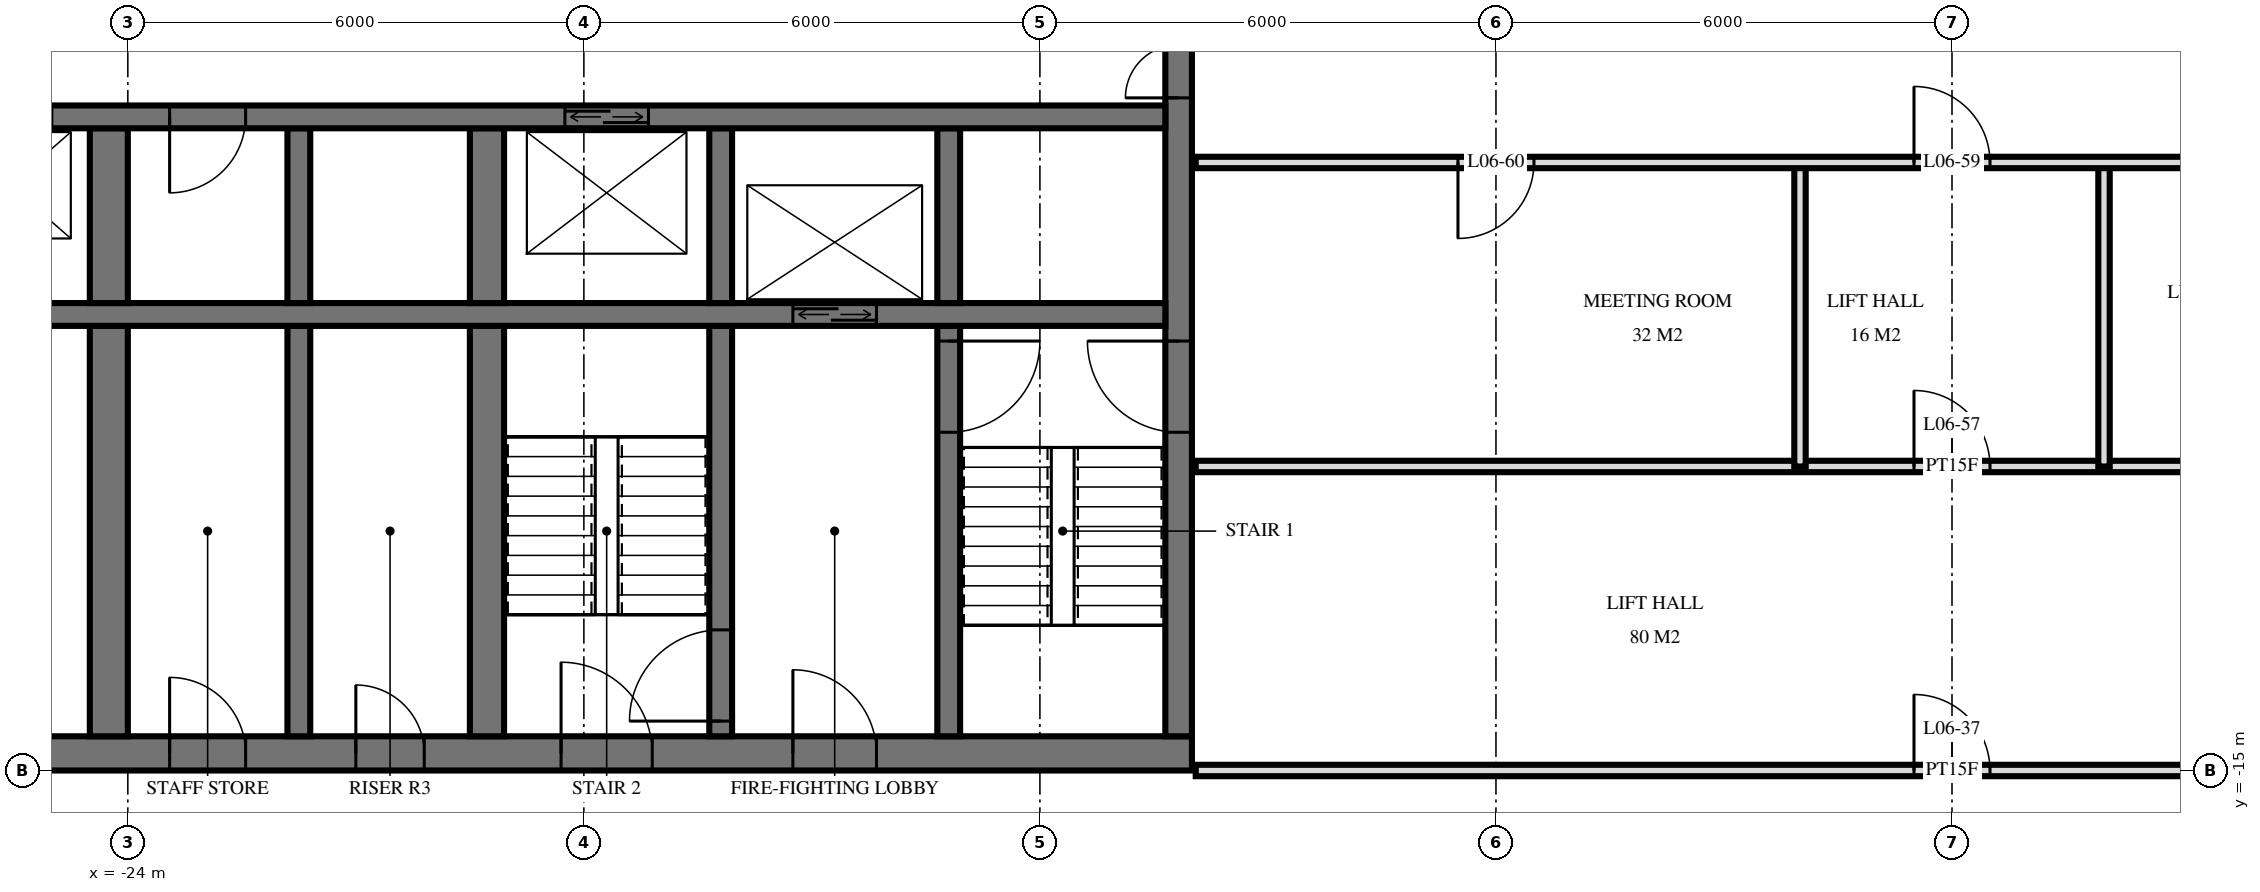
"""IFC4 building model, lengths in metres.
Left out: names, types, materials, properties, quantities, classifications, styles, units other than length and angle.
Written with IfcOpenShell. Run it as: python <this file> out.ifc"""

import sys

from ifc_helpers import new_model, si_unit, direction, frame, frame_2d, origin, place, context, subcontext, project, spatial, rectangle, extrude, element, fill, save


model = new_model("IFC4")
c1 = context("Model", 3, precision=1e-05, world=origin(), true_north=direction((0.0, 1.0)))
c2 = subcontext(c1, "Body", "Model", "MODEL_VIEW")
j1 = project(units=[si_unit("LENGTHUNIT", "METRE"), si_unit("PLANEANGLEUNIT", "RADIAN")], contexts=[c1])
p1 = place(None, origin())
s1 = spatial("IfcSite", under=j1, at=p1, CompositionType="ELEMENT")
p2 = place(p1, origin())
s2 = spatial("IfcBuilding", under=s1, at=p2, CompositionType="ELEMENT")
p3 = place(p2, frame((0.0, 0.0, 31.2)))
s3 = spatial("IfcBuildingStorey", under=s2, at=p3, CompositionType="ELEMENT", Elevation=31.2)
p4 = place(p3, frame((-29.5, -14.775, 0.0), z_axis=(0.0, 0.0, 1.0), x_axis=(1.0, 0.0, 0.0)))
e1 = element("IfcWall", 1, at=p4, inside=s3, PredefinedType="SHEAR", context=c2, shape_type="SweptSolid", body=[
    extrude(rectangle(XDim=19.5, YDim=0.45, at=frame_2d((9.75, 0.0))), origin(), (0.0, 0.0, 1.0), 3.6),
])
p5 = place(p4, frame((11.2, 0.0, 0.0)))
e2 = element("IfcOpeningElement", 2, at=p5, cuts=e1, PredefinedType="OPENING", context=c2, shape_type="SweptSolid", body=[
    extrude(rectangle(XDim=1.2, YDim=2.1, at=frame_2d((0.6, 1.05))), frame((0.0, 0.235, 0.0), z_axis=(0.0, -1.0, 0.0), x_axis=(1.0, 0.0, 0.0)), (0.0, 0.0, 1.0), 0.47),
])
p6 = place(p4, frame((14.25, 0.0, 0.0)))
e3 = element("IfcOpeningElement", 3, at=p6, cuts=e1, PredefinedType="OPENING", context=c2, shape_type="SweptSolid", body=[
    extrude(rectangle(XDim=1.1, YDim=2.1, at=frame_2d((0.55, 1.05))), frame((0.0, 0.235, 0.0), z_axis=(0.0, -1.0, 0.0), x_axis=(1.0, 0.0, 0.0)), (0.0, 0.0, 1.0), 0.47),
])
p7 = place(p4, frame((8.5, 0.0, 0.0)))
e4 = element("IfcOpeningElement", 4, at=p7, cuts=e1, PredefinedType="OPENING", context=c2, shape_type="SweptSolid", body=[
    extrude(rectangle(XDim=0.9, YDim=2.1, at=frame_2d((0.45, 1.05))), frame((0.0, 0.235, 0.0), z_axis=(0.0, -1.0, 0.0), x_axis=(1.0, 0.0, 0.0)), (0.0, 0.0, 1.0), 0.47),
])
p8 = place(p4, frame((6.05, 0.0, 0.0)))
e5 = element("IfcOpeningElement", 5, at=p8, cuts=e1, PredefinedType="OPENING", context=c2, shape_type="SweptSolid", body=[
    extrude(rectangle(XDim=1.0, YDim=2.1, at=frame_2d((0.5, 1.05))), frame((0.0, 0.235, 0.0), z_axis=(0.0, -1.0, 0.0), x_axis=(1.0, 0.0, 0.0)), (0.0, 0.0, 1.0), 0.47),
])
p9 = place(p4, frame((2.988, 0.0, 0.0)))
e6 = element("IfcOpeningElement", 6, at=p9, cuts=e1, PredefinedType="OPENING", context=c2, shape_type="SweptSolid", body=[
    extrude(rectangle(XDim=1.0, YDim=2.1, at=frame_2d((0.5, 1.05))), frame((0.0, 0.235, 0.0), z_axis=(0.0, -1.0, 0.0), x_axis=(1.0, 0.0, 0.0)), (0.0, 0.0, 1.0), 0.47),
])
p10 = place(p4, frame((0.663, 0.0, 0.0)))
e7 = element("IfcOpeningElement", 7, at=p10, cuts=e1, PredefinedType="OPENING", context=c2, shape_type="SweptSolid", body=[
    extrude(rectangle(XDim=1.0, YDim=2.1, at=frame_2d((0.5, 1.05))), frame((0.0, 0.235, 0.0), z_axis=(0.0, -1.0, 0.0), x_axis=(1.0, 0.0, 0.0)), (0.0, 0.0, 1.0), 0.47),
])
p11 = place(p3, frame((-10.175, -14.55, 0.0), z_axis=(0.0, 0.0, 1.0), x_axis=(0.0, 1.0, 0.0)))
e8 = element("IfcWall", 8, at=p11, inside=s3, PredefinedType="SHEAR", context=c2, shape_type="SweptSolid", body=[
    extrude(rectangle(XDim=14.1, YDim=0.35, at=frame_2d((7.05, 0.0))), origin(), (0.0, 0.0, 1.0), 3.6),
])
p12 = place(p11, frame((8.4, 0.0, 0.0)))
e9 = element("IfcOpeningElement", 9, at=p12, cuts=e8, PredefinedType="OPENING", context=c2, shape_type="SweptSolid", body=[
    extrude(rectangle(XDim=1.4, YDim=2.4, at=frame_2d((0.7, 1.2))), frame((0.0, 0.185, 0.0), z_axis=(0.0, -1.0, 0.0), x_axis=(1.0, 0.0, 0.0)), (0.0, 0.0, 1.0), 0.37),
])
p13 = place(p11, frame((10.0, 0.0, 0.0)))
e10 = element("IfcOpeningElement", 10, at=p13, cuts=e8, PredefinedType="OPENING", context=c2, shape_type="SweptSolid", body=[
    extrude(rectangle(XDim=1.4, YDim=2.4, at=frame_2d((0.7, 1.2))), frame((0.0, 0.185, 0.0), z_axis=(0.0, -1.0, 0.0), x_axis=(1.0, 0.0, 0.0)), (0.0, 0.0, 1.0), 0.37),
])
p14 = place(p11, frame((4.0, 0.0, 0.0)))
e11 = element("IfcOpeningElement", 11, at=p14, cuts=e8, PredefinedType="OPENING", context=c2, shape_type="SweptSolid", body=[
    extrude(rectangle(XDim=1.2, YDim=2.1, at=frame_2d((0.6, 1.05))), frame((0.0, 0.185, 0.0), z_axis=(0.0, -1.0, 0.0), x_axis=(1.0, 0.0, 0.0)), (0.0, 0.0, 1.0), 0.37),
])
p15 = place(p3, frame((-29.05, -6.4, 0.0), z_axis=(0.0, 0.0, 1.0), x_axis=(1.0, 0.0, 0.0)))
e12 = element("IfcWall", 12, at=p15, inside=s3, PredefinedType="SHEAR", context=c2, shape_type="SweptSolid", body=[
    extrude(rectangle(XDim=18.7, YDim=0.3, at=frame_2d((9.35, 0.0))), origin(), (0.0, 0.0, 1.0), 3.6),
])
p16 = place(p15, frame((2.95, 0.0, 0.0)))
e13 = element("IfcOpeningElement", 13, at=p16, cuts=e12, PredefinedType="OPENING", context=c2, shape_type="SweptSolid", body=[
    extrude(rectangle(XDim=1.1, YDim=2.1, at=frame_2d((0.55, 1.05))), frame((0.0, 0.16, 0.0), z_axis=(0.0, -1.0, 0.0), x_axis=(1.0, 0.0, 0.0)), (0.0, 0.0, 1.0), 0.32),
])
p17 = place(p15, frame((0.55, 0.0, 0.0)))
e14 = element("IfcOpeningElement", 14, at=p17, cuts=e12, PredefinedType="OPENING", context=c2, shape_type="SweptSolid", body=[
    extrude(rectangle(XDim=1.1, YDim=2.1, at=frame_2d((0.55, 1.05))), frame((0.0, 0.16, 0.0), z_axis=(0.0, -1.0, 0.0), x_axis=(1.0, 0.0, 0.0)), (0.0, 0.0, 1.0), 0.32),
])
p18 = place(p15, frame((10.8, 0.0, 0.0)))
e15 = element("IfcOpeningElement", 15, at=p18, cuts=e12, PredefinedType="OPENING", context=c2, shape_type="SweptSolid", body=[
    extrude(rectangle(XDim=1.1, YDim=2.1, at=frame_2d((0.55, 1.05))), frame((0.0, 0.16, 0.0), z_axis=(0.0, -1.0, 0.0), x_axis=(1.0, 0.0, 0.0)), (0.0, 0.0, 1.0), 0.32),
])
p19 = place(p15, frame((5.6, 0.0, 0.0)))
e16 = element("IfcOpeningElement", 16, at=p19, cuts=e12, PredefinedType="OPENING", context=c2, shape_type="SweptSolid", body=[
    extrude(rectangle(XDim=1.0, YDim=2.1, at=frame_2d((0.5, 1.05))), frame((0.0, 0.16, 0.0), z_axis=(0.0, -1.0, 0.0), x_axis=(1.0, 0.0, 0.0)), (0.0, 0.0, 1.0), 0.32),
])
p20 = place(p3, frame((-29.05, -9.0, 0.0), z_axis=(0.0, 0.0, 1.0), x_axis=(1.0, 0.0, 0.0)))
e17 = element("IfcWall", 17, at=p20, inside=s3, PredefinedType="SHEAR", context=c2, shape_type="SweptSolid", body=[
    extrude(rectangle(XDim=18.7, YDim=0.3, at=frame_2d((9.35, 0.0))), origin(), (0.0, 0.0, 1.0), 3.6),
])
p21 = place(p20, frame((13.8, 0.0, 0.0)))
e18 = element("IfcOpeningElement", 18, at=p21, cuts=e17, PredefinedType="OPENING", context=c2, shape_type="SweptSolid", body=[
    extrude(rectangle(XDim=1.1, YDim=2.1, at=frame_2d((0.55, 1.05))), frame((0.0, 0.16, 0.0), z_axis=(0.0, -1.0, 0.0), x_axis=(1.0, 0.0, 0.0)), (0.0, 0.0, 1.0), 0.32),
])
p22 = place(p3, frame((-13.2, -8.85, 0.0), z_axis=(0.0, 0.0, 1.0), x_axis=(0.0, 1.0, 0.0)))
e19 = element("IfcWall", 19, at=p22, inside=s3, PredefinedType="SHEAR", context=c2, shape_type="SweptSolid", body=[
    extrude(rectangle(XDim=2.3, YDim=0.3, at=frame_2d((1.15, 0.0))), origin(), (0.0, 0.0, 1.0), 3.6),
])
p23 = place(p3, frame((-13.2, -14.55, 0.0), z_axis=(0.0, 0.0, 1.0), x_axis=(0.0, 1.0, 0.0)))
e20 = element("IfcWall", 20, at=p23, inside=s3, PredefinedType="SHEAR", context=c2, shape_type="SweptSolid", body=[
    extrude(rectangle(XDim=5.4, YDim=0.3, at=frame_2d((2.7, 0.0))), origin(), (0.0, 0.0, 1.0), 3.6),
])
p24 = place(p23, frame((4.0, 0.0, 0.0)))
e21 = element("IfcOpeningElement", 21, at=p24, cuts=e20, PredefinedType="OPENING", context=c2, shape_type="SweptSolid", body=[
    extrude(rectangle(XDim=1.2, YDim=2.1, at=frame_2d((0.6, 1.05))), frame((0.0, 0.16, 0.0), z_axis=(0.0, -1.0, 0.0), x_axis=(1.0, 0.0, 0.0)), (0.0, 0.0, 1.0), 0.32),
])
p25 = place(p3, frame((-16.2, -8.85, 0.0), z_axis=(0.0, 0.0, 1.0), x_axis=(0.0, 1.0, 0.0)))
e22 = element("IfcWall", 22, at=p25, inside=s3, PredefinedType="SHEAR", context=c2, shape_type="SweptSolid", body=[
    extrude(rectangle(XDim=2.3, YDim=0.3, at=frame_2d((1.15, 0.0))), origin(), (0.0, 0.0, 1.0), 3.6),
])
p26 = place(p3, frame((-16.2, -14.55, 0.0), z_axis=(0.0, 0.0, 1.0), x_axis=(0.0, 1.0, 0.0)))
e23 = element("IfcWall", 23, at=p26, inside=s3, PredefinedType="SHEAR", context=c2, shape_type="SweptSolid", body=[
    extrude(rectangle(XDim=5.4, YDim=0.3, at=frame_2d((2.7, 0.0))), origin(), (0.0, 0.0, 1.0), 3.6),
])
p27 = place(p26, frame((0.2, 0.0, 0.0)))
e24 = element("IfcOpeningElement", 24, at=p27, cuts=e23, PredefinedType="OPENING", context=c2, shape_type="SweptSolid", body=[
    extrude(rectangle(XDim=1.2, YDim=2.1, at=frame_2d((0.6, 1.05))), frame((0.0, 0.16, 0.0), z_axis=(0.0, -1.0, 0.0), x_axis=(1.0, 0.0, 0.0)), (0.0, 0.0, 1.0), 0.32),
])
p28 = place(p3, frame((-19.275, -8.85, 0.0), z_axis=(0.0, 0.0, 1.0), x_axis=(0.0, 1.0, 0.0)))
e25 = element("IfcWall", 25, at=p28, inside=s3, PredefinedType="SHEAR", context=c2, shape_type="SweptSolid", body=[
    extrude(rectangle(XDim=2.3, YDim=0.45, at=frame_2d((1.15, 0.0))), origin(), (0.0, 0.0, 1.0), 3.6),
])
p29 = place(p3, frame((-19.275, -14.55, 0.0), z_axis=(0.0, 0.0, 1.0), x_axis=(0.0, 1.0, 0.0)))
e26 = element("IfcWall", 26, at=p29, inside=s3, PredefinedType="SHEAR", context=c2, shape_type="SweptSolid", body=[
    extrude(rectangle(XDim=5.4, YDim=0.45, at=frame_2d((2.7, 0.0))), origin(), (0.0, 0.0, 1.0), 3.6),
])
p30 = place(p3, frame((-21.75, -8.85, 0.0), z_axis=(0.0, 0.0, 1.0), x_axis=(0.0, 1.0, 0.0)))
e27 = element("IfcWall", 27, at=p30, inside=s3, PredefinedType="SHEAR", context=c2, shape_type="SweptSolid", body=[
    extrude(rectangle(XDim=2.3, YDim=0.3, at=frame_2d((1.15, 0.0))), origin(), (0.0, 0.0, 1.0), 3.6),
])
p31 = place(p3, frame((-21.75, -14.55, 0.0), z_axis=(0.0, 0.0, 1.0), x_axis=(0.0, 1.0, 0.0)))
e28 = element("IfcWall", 28, at=p31, inside=s3, PredefinedType="SHEAR", context=c2, shape_type="SweptSolid", body=[
    extrude(rectangle(XDim=5.4, YDim=0.3, at=frame_2d((2.7, 0.0))), origin(), (0.0, 0.0, 1.0), 3.6),
])
p32 = place(p3, frame((-24.25, -8.85, 0.0), z_axis=(0.0, 0.0, 1.0), x_axis=(0.0, 1.0, 0.0)))
e29 = element("IfcWall", 29, at=p32, inside=s3, PredefinedType="SHEAR", context=c2, shape_type="SweptSolid", body=[
    extrude(rectangle(XDim=2.3, YDim=0.5, at=frame_2d((1.15, 0.0))), origin(), (0.0, 0.0, 1.0), 3.6),
])
p33 = place(p3, frame((-24.25, -14.55, 0.0), z_axis=(0.0, 0.0, 1.0), x_axis=(0.0, 1.0, 0.0)))
e30 = element("IfcWall", 30, at=p33, inside=s3, PredefinedType="SHEAR", context=c2, shape_type="SweptSolid", body=[
    extrude(rectangle(XDim=5.4, YDim=0.5, at=frame_2d((2.7, 0.0))), origin(), (0.0, 0.0, 1.0), 3.6),
])
for number, where, z_axis, x_axis in (
    (31, (2.0, -11.0, 0.0), (0.0, 0.0, 1.0), (0.0, 1.0, 0.0)),
    (32, (-2.0, -11.0, 0.0), (0.0, 0.0, 1.0), (0.0, 1.0, 0.0)),
):
    element("IfcWall", number, at=place(p3, frame(where, z_axis=z_axis, x_axis=x_axis)), inside=s3, PredefinedType="PARTITIONING", context=c2, shape_type="SweptSolid", body=[
        extrude(rectangle(XDim=4.0, YDim=0.15, at=frame_2d((2.0, 0.0))), origin(), (0.0, 0.0, 1.0), 3.32),
    ])
p34 = place(p3, frame((-9.95, -15.0, 0.0), z_axis=(0.0, 0.0, 1.0), x_axis=(1.0, 0.0, 0.0)))
e33 = element("IfcWall", 33, at=p34, inside=s3, PredefinedType="PARTITIONING", context=c2, shape_type="SweptSolid", body=[
    extrude(rectangle(XDim=19.9, YDim=0.15, at=frame_2d((9.95, 0.0))), origin(), (0.0, 0.0, 1.0), 2.684),
])
p35 = place(p34, frame((9.45, 0.0, 0.0)))
e34 = element("IfcOpeningElement", 34, at=p35, cuts=e33, PredefinedType="OPENING", context=c2, shape_type="SweptSolid", body=[
    extrude(rectangle(XDim=1.0, YDim=2.1, at=frame_2d((0.5, 1.05))), frame((0.0, 0.085, 0.0), z_axis=(0.0, -1.0, 0.0), x_axis=(1.0, 0.0, 0.0)), (0.0, 0.0, 1.0), 0.17),
])
p36 = place(p3, frame((-9.95, -11.0, 0.0), z_axis=(0.0, 0.0, 1.0), x_axis=(1.0, 0.0, 0.0)))
e35 = element("IfcWall", 35, at=p36, inside=s3, PredefinedType="PARTITIONING", context=c2, shape_type="SweptSolid", body=[
    extrude(rectangle(XDim=19.9, YDim=0.15, at=frame_2d((9.95, 0.0))), origin(), (0.0, 0.0, 1.0), 3.32),
])
p37 = place(p36, frame((9.45, 0.0, 0.0)))
e36 = element("IfcOpeningElement", 36, at=p37, cuts=e35, PredefinedType="OPENING", context=c2, shape_type="SweptSolid", body=[
    extrude(rectangle(XDim=1.0, YDim=2.1, at=frame_2d((0.5, 1.05))), frame((0.0, 0.085, 0.0), z_axis=(0.0, -1.0, 0.0), x_axis=(1.0, 0.0, 0.0)), (0.0, 0.0, 1.0), 0.17),
])
p38 = place(p36, frame((15.45, 0.0, 0.0)))
e37 = element("IfcOpeningElement", 37, at=p38, cuts=e35, PredefinedType="OPENING", context=c2, shape_type="SweptSolid", body=[
    extrude(rectangle(XDim=1.0, YDim=2.1, at=frame_2d((0.5, 1.05))), frame((0.0, 0.085, 0.0), z_axis=(0.0, -1.0, 0.0), x_axis=(1.0, 0.0, 0.0)), (0.0, 0.0, 1.0), 0.17),
])
p39 = place(p3, frame((-9.95, -7.0, 0.0), z_axis=(0.0, 0.0, 1.0), x_axis=(1.0, 0.0, 0.0)))
e38 = element("IfcWall", 38, at=p39, inside=s3, PredefinedType="PARTITIONING", context=c2, shape_type="SweptSolid", body=[
    extrude(rectangle(XDim=19.9, YDim=0.15, at=frame_2d((9.95, 0.0))), origin(), (0.0, 0.0, 1.0), 3.32),
])
p40 = place(p39, frame((9.45, 0.0, 0.0)))
e39 = element("IfcOpeningElement", 39, at=p40, cuts=e38, PredefinedType="OPENING", context=c2, shape_type="SweptSolid", body=[
    extrude(rectangle(XDim=1.0, YDim=2.1, at=frame_2d((0.5, 1.05))), frame((0.0, 0.085, 0.0), z_axis=(0.0, -1.0, 0.0), x_axis=(1.0, 0.0, 0.0)), (0.0, 0.0, 1.0), 0.17),
])
p41 = place(p39, frame((3.45, 0.0, 0.0)))
e40 = element("IfcOpeningElement", 40, at=p41, cuts=e38, PredefinedType="OPENING", context=c2, shape_type="SweptSolid", body=[
    extrude(rectangle(XDim=1.0, YDim=2.1, at=frame_2d((0.5, 1.05))), frame((0.0, 0.085, 0.0), z_axis=(0.0, -1.0, 0.0), x_axis=(1.0, 0.0, 0.0)), (0.0, 0.0, 1.0), 0.17),
])
p42 = place(p21, origin())
e41 = element("IfcDoor", 41, at=p42, inside=s3, OperationType="DOUBLE_DOOR_SLIDING", PredefinedType="USERDEFINED", context=c2, shape_type="SweptSolid", body=[
    extrude(rectangle(XDim=1.1, YDim=2.1, at=frame_2d((0.55, 1.05))), frame((0.0, 0.025, 0.0), z_axis=(0.0, -1.0, 0.0), x_axis=(1.0, 0.0, 0.0)), (0.0, 0.0, 1.0), 0.05),
])
fill(e18, e41)
p43 = place(p18, origin())
e42 = element("IfcDoor", 42, at=p43, inside=s3, OperationType="DOUBLE_DOOR_SLIDING", PredefinedType="USERDEFINED", context=c2, shape_type="SweptSolid", body=[
    extrude(rectangle(XDim=1.1, YDim=2.1, at=frame_2d((0.55, 1.05))), frame((0.0, 0.025, 0.0), z_axis=(0.0, -1.0, 0.0), x_axis=(1.0, 0.0, 0.0)), (0.0, 0.0, 1.0), 0.05),
])
fill(e15, e42)
p44 = place(p12, origin())
e43 = element("IfcDoor", 43, at=p44, inside=s3, OperationType="DOUBLE_DOOR_SINGLE_SWING", PredefinedType="DOOR", context=c2, shape_type="SweptSolid", body=[
    extrude(rectangle(XDim=1.4, YDim=2.4, at=frame_2d((0.7, 1.2))), frame((0.0, 0.025, 0.0), z_axis=(0.0, -1.0, 0.0), x_axis=(1.0, 0.0, 0.0)), (0.0, 0.0, 1.0), 0.05),
])
fill(e9, e43)
p45 = place(p14, origin())
e44 = element("IfcDoor", 44, at=p45, inside=s3, OperationType="SINGLE_SWING_LEFT", PredefinedType="DOOR", context=c2, shape_type="SweptSolid", body=[
    extrude(rectangle(XDim=1.2, YDim=2.1, at=frame_2d((0.6, 1.05))), frame((0.0, 0.025, 0.0), z_axis=(0.0, -1.0, 0.0), x_axis=(1.0, 0.0, 0.0)), (0.0, 0.0, 1.0), 0.05),
])
fill(e11, e44)
p46 = place(p5, origin())
e45 = element("IfcDoor", 45, at=p46, inside=s3, OperationType="SINGLE_SWING_RIGHT", PredefinedType="DOOR", context=c2, shape_type="SweptSolid", body=[
    extrude(rectangle(XDim=1.2, YDim=2.1, at=frame_2d((0.6, 1.05))), frame((0.0, 0.025, 0.0), z_axis=(0.0, -1.0, 0.0), x_axis=(1.0, 0.0, 0.0)), (0.0, 0.0, 1.0), 0.05),
])
fill(e2, e45)
p47 = place(p6, origin())
e46 = element("IfcDoor", 46, at=p47, inside=s3, OperationType="SINGLE_SWING_RIGHT", PredefinedType="DOOR", context=c2, shape_type="SweptSolid", body=[
    extrude(rectangle(XDim=1.1, YDim=2.1, at=frame_2d((0.55, 1.05))), frame((0.0, 0.025, 0.0), z_axis=(0.0, -1.0, 0.0), x_axis=(1.0, 0.0, 0.0)), (0.0, 0.0, 1.0), 0.05),
])
fill(e3, e46)
p48 = place(p7, origin())
e47 = element("IfcDoor", 47, at=p48, inside=s3, OperationType="SINGLE_SWING_RIGHT", PredefinedType="DOOR", context=c2, shape_type="SweptSolid", body=[
    extrude(rectangle(XDim=0.9, YDim=2.1, at=frame_2d((0.45, 1.05))), frame((0.0, 0.025, 0.0), z_axis=(0.0, -1.0, 0.0), x_axis=(1.0, 0.0, 0.0)), (0.0, 0.0, 1.0), 0.05),
])
fill(e4, e47)
p49 = place(p8, origin())
e48 = element("IfcDoor", 48, at=p49, inside=s3, OperationType="SINGLE_SWING_RIGHT", PredefinedType="DOOR", context=c2, shape_type="SweptSolid", body=[
    extrude(rectangle(XDim=1.0, YDim=2.1, at=frame_2d((0.5, 1.05))), frame((0.0, 0.025, 0.0), z_axis=(0.0, -1.0, 0.0), x_axis=(1.0, 0.0, 0.0)), (0.0, 0.0, 1.0), 0.05),
])
fill(e5, e48)
p50 = place(p19, frame((0.5, 0.0, 0.0), z_axis=(0.0, 0.0, 1.0), x_axis=(-1.0, 0.0, 0.0)))
e49 = element("IfcDoor", 49, at=p50, inside=s3, OperationType="SINGLE_SWING_LEFT", PredefinedType="DOOR", context=c2, shape_type="SweptSolid", body=[
    extrude(rectangle(XDim=1.0, YDim=2.1, at=frame_2d((0.0, 1.05))), frame((0.0, -0.025, 0.0), z_axis=(0.0, 1.0, 0.0), x_axis=(-1.0, 0.0, 0.0)), (0.0, 0.0, 1.0), 0.05),
])
fill(e16, e49)
p51 = place(p24, frame((0.6, 0.0, 0.0), z_axis=(0.0, 0.0, 1.0), x_axis=(-1.0, 0.0, 0.0)))
e50 = element("IfcDoor", 50, at=p51, inside=s3, OperationType="SINGLE_SWING_RIGHT", PredefinedType="DOOR", context=c2, shape_type="SweptSolid", body=[
    extrude(rectangle(XDim=1.2, YDim=2.1, at=frame_2d((0.0, 1.05))), frame((0.0, -0.025, 0.0), z_axis=(0.0, 1.0, 0.0), x_axis=(-1.0, 0.0, 0.0)), (0.0, 0.0, 1.0), 0.05),
])
fill(e21, e50)
p52 = place(p27, origin())
e51 = element("IfcDoor", 51, at=p52, inside=s3, OperationType="SINGLE_SWING_RIGHT", PredefinedType="DOOR", context=c2, shape_type="SweptSolid", body=[
    extrude(rectangle(XDim=1.2, YDim=2.1, at=frame_2d((0.6, 1.05))), frame((0.0, 0.025, 0.0), z_axis=(0.0, -1.0, 0.0), x_axis=(1.0, 0.0, 0.0)), (0.0, 0.0, 1.0), 0.05),
])
fill(e24, e51)
p53 = place(p35, origin())
e52 = element("IfcDoor", 52, at=p53, inside=s3, OperationType="SINGLE_SWING_RIGHT", PredefinedType="DOOR", context=c2, shape_type="SweptSolid", body=[
    extrude(rectangle(XDim=1.0, YDim=2.1, at=frame_2d((0.5, 1.05))), frame((0.0, 0.025, 0.0), z_axis=(0.0, -1.0, 0.0), x_axis=(1.0, 0.0, 0.0)), (0.0, 0.0, 1.0), 0.05),
])
fill(e34, e52)
p54 = place(p37, origin())
e53 = element("IfcDoor", 53, at=p54, inside=s3, OperationType="SINGLE_SWING_RIGHT", PredefinedType="DOOR", context=c2, shape_type="SweptSolid", body=[
    extrude(rectangle(XDim=1.0, YDim=2.1, at=frame_2d((0.5, 1.05))), frame((0.0, 0.025, 0.0), z_axis=(0.0, -1.0, 0.0), x_axis=(1.0, 0.0, 0.0)), (0.0, 0.0, 1.0), 0.05),
])
fill(e36, e53)
p55 = place(p40, origin())
e54 = element("IfcDoor", 54, at=p55, inside=s3, OperationType="SINGLE_SWING_RIGHT", PredefinedType="DOOR", context=c2, shape_type="SweptSolid", body=[
    extrude(rectangle(XDim=1.0, YDim=2.1, at=frame_2d((0.5, 1.05))), frame((0.0, 0.025, 0.0), z_axis=(0.0, -1.0, 0.0), x_axis=(1.0, 0.0, 0.0)), (0.0, 0.0, 1.0), 0.05),
])
fill(e39, e54)
p56 = place(p41, frame((0.5, 0.0, 0.0), z_axis=(0.0, 0.0, 1.0), x_axis=(-1.0, 0.0, 0.0)))
e55 = element("IfcDoor", 55, at=p56, inside=s3, OperationType="SINGLE_SWING_LEFT", PredefinedType="DOOR", context=c2, shape_type="SweptSolid", body=[
    extrude(rectangle(XDim=1.0, YDim=2.1, at=frame_2d((0.0, 1.05))), frame((0.0, -0.025, 0.0), z_axis=(0.0, 1.0, 0.0), x_axis=(-1.0, 0.0, 0.0)), (0.0, 0.0, 1.0), 0.05),
])
fill(e40, e55)
save(model, sys.argv[1])
